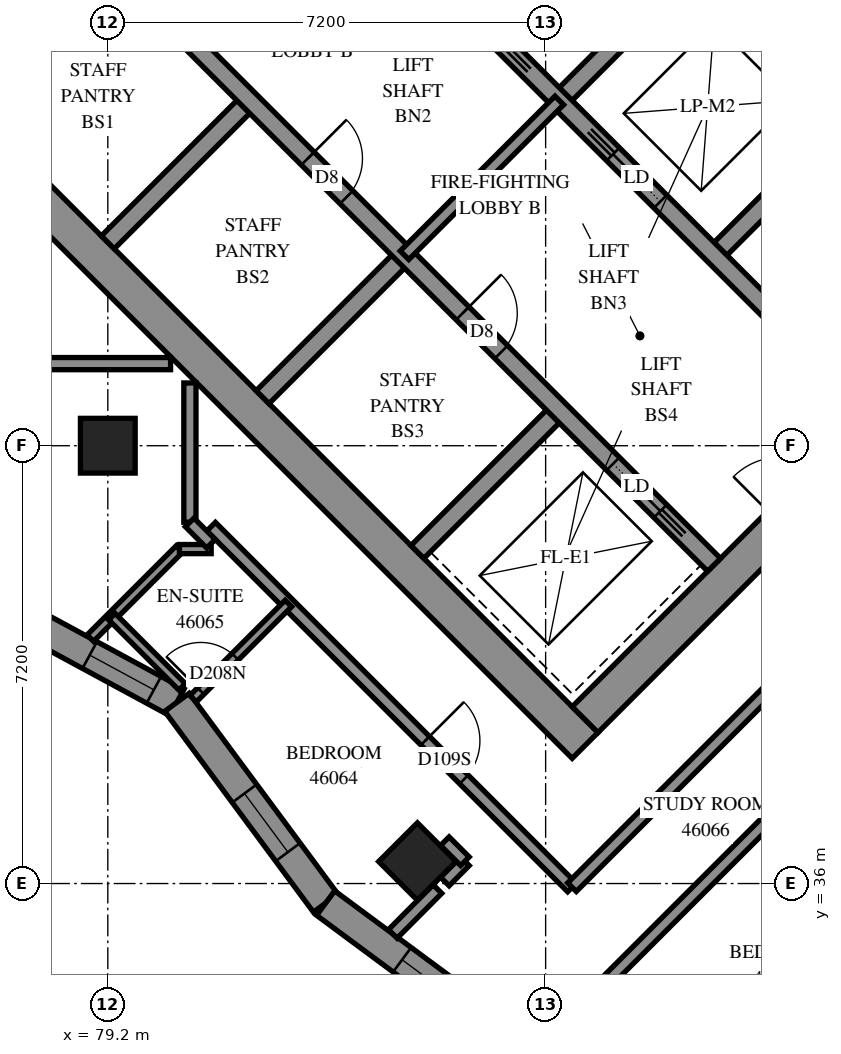
"""IFC4 building model, lengths in metres.
Left out: names, types, materials, properties, quantities, classifications, styles, units other than length and angle.
Written with IfcOpenShell. Run it as: python <this file> out.ifc"""

import sys

from ifc_helpers import new_model, si_unit, direction, frame, frame_2d, origin, origin_2d, place, context, subcontext, project, spatial, polyline, rectangle, outline, extrude, element, fill, save


model = new_model("IFC4")
c1 = context("Model", 3, precision=1e-05, world=origin(), true_north=direction((0.0, 1.0)))
c2 = subcontext(c1, "Body", "Model", "MODEL_VIEW")
j1 = project(units=[si_unit("LENGTHUNIT", "METRE"), si_unit("PLANEANGLEUNIT", "RADIAN")], contexts=[c1])
p1 = place(None, origin())
s1 = spatial("IfcSite", under=j1, at=p1, CompositionType="ELEMENT")
p2 = place(p1, origin())
s2 = spatial("IfcBuilding", under=s1, at=p2, CompositionType="ELEMENT")
p3 = place(p2, frame((0.0, 0.0, 169.4)))
s3 = spatial("IfcBuildingStorey", under=s2, at=p3, CompositionType="ELEMENT", Elevation=169.4)
for number, where, z_axis, x_axis in (
    (1, (79.2, 43.2, 0.0), (0.0, 0.0, 1.0), (1.0, 0.0, 0.0)),
    (2, (84.291, 36.362, 0.0), (0.0, 0.0, 1.0), (0.707, -0.707, 0.0)),
):
    element("IfcColumn", number, at=place(p3, frame(where, z_axis=z_axis, x_axis=x_axis)), inside=s3, PredefinedType="COLUMN", context=c2, shape_type="SweptSolid", body=[
        extrude(rectangle(XDim=0.9, YDim=0.9, at=origin_2d()), origin(), (0.0, 0.0, 1.0), 3.1),
    ])
p4 = place(p3, frame((76.018, 49.302, -0.3), z_axis=(0.0, 0.0, 1.0), x_axis=(0.7071067812, -0.7071067812, 0.0)))
e3 = element("IfcWall", 3, at=p4, inside=s3, PredefinedType="SHEAR", context=c2, shape_type="SweptSolid", body=[
    extrude(rectangle(XDim=15.6, YDim=0.6, at=frame_2d((7.8, 0.0))), origin(), (0.0, 0.0, 1.0), 2.7),
])
p5 = place(p3, frame((86.625, 59.908, -0.3), z_axis=(0.0, 0.0, 1.0), x_axis=(0.7071067812, -0.7071067812, 0.0)))
e4 = element("IfcWall", 4, at=p5, inside=s3, PredefinedType="SHEAR", context=c2, shape_type="SweptSolid", body=[
    extrude(rectangle(XDim=15.6, YDim=0.6, at=frame_2d((7.8, 0.0))), origin(), (0.0, 0.0, 1.0), 2.7),
])
p6 = place(p5, frame((10.6, 0.0, 0.3)))
e5 = element("IfcOpeningElement", 5, at=p6, cuts=e4, PredefinedType="OPENING", context=c2, shape_type="SweptSolid", body=[
    extrude(rectangle(XDim=0.8, YDim=2.1, at=frame_2d((0.4, 1.05))), frame((0.0, 0.31, 0.0), z_axis=(0.0, -1.0, 0.0), x_axis=(1.0, 0.0, 0.0)), (0.0, 0.0, 1.0), 0.62),
])
p7 = place(p3, frame((76.442, 49.302, -0.3), z_axis=(0.0, 0.0, 1.0), x_axis=(0.7071067812, 0.7071067812, 0.0)))
e6 = element("IfcWall", 6, at=p7, inside=s3, PredefinedType="SHEAR", context=c2, shape_type="SweptSolid", body=[
    extrude(rectangle(XDim=14.4, YDim=0.6, at=frame_2d((7.2, 0.0))), origin(), (0.0, 0.0, 1.0), 2.7),
])
p8 = place(p7, frame((4.55, 0.0, 0.3)))
e7 = element("IfcOpeningElement", 7, at=p8, cuts=e6, PredefinedType="OPENING", context=c2, shape_type="SweptSolid", body=[
    extrude(rectangle(XDim=1.1, YDim=2.1, at=frame_2d((0.55, 1.05))), frame((0.0, 0.31, 0.0), z_axis=(0.0, -1.0, 0.0), x_axis=(1.0, 0.0, 0.0)), (0.0, 0.0, 1.0), 0.62),
])
p9 = place(p7, frame((11.35, 0.0, 0.3)))
e8 = element("IfcOpeningElement", 8, at=p9, cuts=e6, PredefinedType="OPENING", context=c2, shape_type="SweptSolid", body=[
    extrude(rectangle(XDim=1.1, YDim=2.1, at=frame_2d((0.55, 1.05))), frame((0.0, 0.31, 0.0), z_axis=(0.0, -1.0, 0.0), x_axis=(1.0, 0.0, 0.0)), (0.0, 0.0, 1.0), 0.62),
])
p10 = place(p3, frame((87.049, 38.695, -0.3), z_axis=(0.0, 0.0, 1.0), x_axis=(0.7071067812, 0.7071067812, 0.0)))
e9 = element("IfcWall", 9, at=p10, inside=s3, PredefinedType="SHEAR", context=c2, shape_type="SweptSolid", body=[
    extrude(rectangle(XDim=14.4, YDim=0.6, at=frame_2d((7.2, 0.0))), origin(), (0.0, 0.0, 1.0), 2.7),
])
p11 = place(p10, frame((4.55, 0.0, 0.3)))
e10 = element("IfcOpeningElement", 10, at=p11, cuts=e9, PredefinedType="OPENING", context=c2, shape_type="SweptSolid", body=[
    extrude(rectangle(XDim=1.1, YDim=2.1, at=frame_2d((0.55, 1.05))), frame((0.0, 0.31, 0.0), z_axis=(0.0, -1.0, 0.0), x_axis=(1.0, 0.0, 0.0)), (0.0, 0.0, 1.0), 0.62),
])
p12 = place(p10, frame((11.35, 0.0, 0.3)))
e11 = element("IfcOpeningElement", 11, at=p12, cuts=e9, PredefinedType="OPENING", context=c2, shape_type="SweptSolid", body=[
    extrude(rectangle(XDim=1.1, YDim=2.1, at=frame_2d((0.55, 1.05))), frame((0.0, 0.31, 0.0), z_axis=(0.0, -1.0, 0.0), x_axis=(1.0, 0.0, 0.0)), (0.0, 0.0, 1.0), 0.62),
])
p13 = place(p3, frame((79.2, 46.544, 0.0), z_axis=(0.0, 0.0, 1.0), x_axis=(0.7071219326, 0.7070916295, 0.0)))
e12 = element("IfcWall", 12, at=p13, inside=s3, PredefinedType="SOLIDWALL", context=c2, shape_type="SweptSolid", body=[
    extrude(rectangle(XDim=3.3, YDim=0.3, at=frame_2d((1.65, 0.0))), origin(), (0.0, 0.0, 1.0), 3.1),
])
p14 = place(p3, frame((81.746, 43.999, 0.0), z_axis=(0.0, 0.0, 1.0), x_axis=(0.7071067812, 0.7071067812, 0.0)))
e13 = element("IfcWall", 13, at=p14, inside=s3, PredefinedType="SOLIDWALL", context=c2, shape_type="SweptSolid", body=[
    extrude(rectangle(XDim=3.3, YDim=0.3, at=frame_2d((1.65, 0.0))), origin(), (0.0, 0.0, 1.0), 3.1),
])
p15 = place(p3, frame((86.625, 48.878, 0.0), z_axis=(0.0, 0.0, 1.0), x_axis=(0.7071067812, 0.7071067812, 0.0)))
e14 = element("IfcWall", 14, at=p15, inside=s3, PredefinedType="SOLIDWALL", context=c2, shape_type="SweptSolid", body=[
    extrude(rectangle(XDim=3.3, YDim=0.3, at=frame_2d((1.65, 0.0))), origin(), (0.0, 0.0, 1.0), 3.1),
])
p16 = place(p3, frame((84.291, 41.453, 0.0), z_axis=(0.0, 0.0, 1.0), x_axis=(0.7071067812, 0.7071067812, 0.0)))
e15 = element("IfcWall", 15, at=p16, inside=s3, PredefinedType="SOLIDWALL", context=c2, shape_type="SweptSolid", body=[
    extrude(rectangle(XDim=3.3, YDim=0.3, at=frame_2d((1.65, 0.0))), origin(), (0.0, 0.0, 1.0), 3.1),
])
p17 = place(p3, frame((89.17, 46.332, 0.0), z_axis=(0.0, 0.0, 1.0), x_axis=(0.7071067812, 0.7071067812, 0.0)))
e16 = element("IfcWall", 16, at=p17, inside=s3, PredefinedType="SOLIDWALL", context=c2, shape_type="SweptSolid", body=[
    extrude(rectangle(XDim=3.3, YDim=0.3, at=frame_2d((1.65, 0.0))), origin(), (0.0, 0.0, 1.0), 3.1),
])
p18 = place(p3, frame((78.988, 51.423, 0.0), z_axis=(0.0, 0.0, 1.0), x_axis=(0.7071067812, -0.7071067812, 0.0)))
e17 = element("IfcWall", 17, at=p18, inside=s3, PredefinedType="SOLIDWALL", context=c2, shape_type="SweptSolid", body=[
    extrude(rectangle(XDim=14.4, YDim=0.3, at=frame_2d((7.2, 0.0))), origin(), (0.0, 0.0, 1.0), 3.1),
])
p19 = place(p18, frame((1.35, 0.0, 0.0)))
e18 = element("IfcOpeningElement", 18, at=p19, cuts=e17, PredefinedType="OPENING", context=c2, shape_type="SweptSolid", body=[
    extrude(rectangle(XDim=0.9, YDim=2.1, at=frame_2d((0.45, 1.05))), frame((0.0, 0.16, 0.0), z_axis=(0.0, -1.0, 0.0), x_axis=(1.0, 0.0, 0.0)), (0.0, 0.0, 1.0), 0.32),
])
p20 = place(p18, frame((4.95, 0.0, 0.0)))
e19 = element("IfcOpeningElement", 19, at=p20, cuts=e17, PredefinedType="OPENING", context=c2, shape_type="SweptSolid", body=[
    extrude(rectangle(XDim=0.9, YDim=2.1, at=frame_2d((0.45, 1.05))), frame((0.0, 0.16, 0.0), z_axis=(0.0, -1.0, 0.0), x_axis=(1.0, 0.0, 0.0)), (0.0, 0.0, 1.0), 0.32),
])
p21 = place(p18, frame((8.55, 0.0, 0.0)))
e20 = element("IfcOpeningElement", 20, at=p21, cuts=e17, PredefinedType="OPENING", context=c2, shape_type="SweptSolid", body=[
    extrude(rectangle(XDim=0.9, YDim=2.1, at=frame_2d((0.45, 1.05))), frame((0.0, 0.16, 0.0), z_axis=(0.0, -1.0, 0.0), x_axis=(1.0, 0.0, 0.0)), (0.0, 0.0, 1.0), 0.32),
])
p22 = place(p18, frame((12.05, 0.0, 0.0)))
e21 = element("IfcOpeningElement", 21, at=p22, cuts=e17, PredefinedType="OPENING", context=c2, shape_type="SweptSolid", body=[
    extrude(rectangle(XDim=1.1, YDim=2.1, at=frame_2d((0.55, 1.05))), frame((0.0, 0.16, 0.0), z_axis=(0.0, -1.0, 0.0), x_axis=(1.0, 0.0, 0.0)), (0.0, 0.0, 1.0), 0.32),
])
p23 = place(p3, frame((81.534, 53.969, 0.0), z_axis=(0.0, 0.0, 1.0), x_axis=(0.707103309, -0.7071102534, 0.0)))
e22 = element("IfcWall", 22, at=p23, inside=s3, PredefinedType="SOLIDWALL", context=c2, shape_type="SweptSolid", body=[
    extrude(rectangle(XDim=14.4, YDim=0.3, at=frame_2d((7.2, 0.0))), origin(), (0.0, 0.0, 1.0), 3.1),
])
p24 = place(p23, frame((1.25, 0.0, 0.0)))
e23 = element("IfcOpeningElement", 23, at=p24, cuts=e22, PredefinedType="OPENING", context=c2, shape_type="SweptSolid", body=[
    extrude(rectangle(XDim=1.1, YDim=2.1, at=frame_2d((0.55, 1.05))), frame((0.0, 0.16, 0.0), z_axis=(0.0, -1.0, 0.0), x_axis=(1.0, 0.0, 0.0)), (0.0, 0.0, 1.0), 0.32),
])
p25 = place(p23, frame((4.85, 0.0, 0.0)))
e24 = element("IfcOpeningElement", 24, at=p25, cuts=e22, PredefinedType="OPENING", context=c2, shape_type="SweptSolid", body=[
    extrude(rectangle(XDim=1.1, YDim=2.1, at=frame_2d((0.55, 1.05))), frame((0.0, 0.16, 0.0), z_axis=(0.0, -1.0, 0.0), x_axis=(1.0, 0.0, 0.0)), (0.0, 0.0, 1.0), 0.32),
])
p26 = place(p23, frame((8.45, 0.0, 0.0)))
e25 = element("IfcOpeningElement", 25, at=p26, cuts=e22, PredefinedType="OPENING", context=c2, shape_type="SweptSolid", body=[
    extrude(rectangle(XDim=1.1, YDim=2.1, at=frame_2d((0.55, 1.05))), frame((0.0, 0.16, 0.0), z_axis=(0.0, -1.0, 0.0), x_axis=(1.0, 0.0, 0.0)), (0.0, 0.0, 1.0), 0.32),
])
p27 = place(p23, frame((12.05, 0.0, 0.0)))
e26 = element("IfcOpeningElement", 26, at=p27, cuts=e22, PredefinedType="OPENING", context=c2, shape_type="SweptSolid", body=[
    extrude(rectangle(XDim=1.1, YDim=2.1, at=frame_2d((0.55, 1.05))), frame((0.0, 0.16, 0.0), z_axis=(0.0, -1.0, 0.0), x_axis=(1.0, 0.0, 0.0)), (0.0, 0.0, 1.0), 0.32),
])
p28 = place(p3, frame((88.958, 51.211, 0.0), z_axis=(0.0, 0.0, 1.0), x_axis=(0.7070998367, -0.7071137256, 0.0)))
e27 = element("IfcWall", 27, at=p28, inside=s3, PredefinedType="SOLIDWALL", context=c2, shape_type="SweptSolid", body=[
    extrude(rectangle(XDim=7.2, YDim=0.3, at=frame_2d((3.6, 0.0))), origin(), (0.0, 0.0, 1.0), 3.1),
])
p29 = place(p3, frame((76.559, 41.026, 0.0), z_axis=(0.0, 0.0, 1.0), x_axis=(0.8793114622, -0.4762471547, 0.0)))
e28 = element("IfcWall", 28, at=p29, inside=s3, PredefinedType="SOLIDWALL", context=c2, shape_type="SweptSolid", body=[
    extrude(outline(polyline([(0.02, -0.25), (4.241, -0.25), (4.352, 0.25), (-0.02, 0.25), (0.02, -0.25)])), origin(), (0.0, 0.0, 1.0), 3.1),
])
p30 = place(p29, frame((0.317, 0.0, 0.45)))
e29 = element("IfcOpeningElement", 29, at=p30, cuts=e28, PredefinedType="OPENING", context=c2, shape_type="SweptSolid", body=[
    extrude(rectangle(XDim=1.2, YDim=2.5, at=frame_2d((0.6, 1.25))), frame((0.0, 0.26, 0.0), z_axis=(0.0, -1.0, 0.0), x_axis=(1.0, 0.0, 0.0)), (0.0, 0.0, 1.0), 0.52),
])
p31 = place(p29, frame((2.665, 0.0, 0.45)))
e30 = element("IfcOpeningElement", 30, at=p31, cuts=e28, PredefinedType="OPENING", context=c2, shape_type="SweptSolid", body=[
    extrude(rectangle(XDim=1.2, YDim=2.5, at=frame_2d((0.6, 1.25))), frame((0.0, 0.26, 0.0), z_axis=(0.0, -1.0, 0.0), x_axis=(1.0, 0.0, 0.0)), (0.0, 0.0, 1.0), 0.52),
])
p32 = place(p3, frame((80.337, 38.98, 0.0), z_axis=(0.0, 0.0, 1.0), x_axis=(0.5951291823, -0.8036300495, 0.0)))
e31 = element("IfcWall", 31, at=p32, inside=s3, PredefinedType="SOLIDWALL", context=c2, shape_type="SweptSolid", body=[
    extrude(outline(polyline([(0.056, -0.25), (4.146, -0.25), (4.072, 0.25), (-0.056, 0.25), (0.056, -0.25)])), origin(), (0.0, 0.0, 1.0), 3.1),
])
p33 = place(p32, frame((1.865, 0.0, 0.45)))
e32 = element("IfcOpeningElement", 32, at=p33, cuts=e31, PredefinedType="OPENING", context=c2, shape_type="SweptSolid", body=[
    extrude(rectangle(XDim=1.2, YDim=2.5, at=frame_2d((0.6, 1.25))), frame((0.0, 0.26, 0.0), z_axis=(0.0, -1.0, 0.0), x_axis=(1.0, 0.0, 0.0)), (0.0, 0.0, 1.0), 0.52),
])
p34 = place(p3, frame((82.782, 35.678, 0.0), z_axis=(0.0, 0.0, 1.0), x_axis=(0.8036316743, -0.5951269881, 0.0)))
e33 = element("IfcWall", 33, at=p34, inside=s3, PredefinedType="SOLIDWALL", context=c2, shape_type="SweptSolid", body=[
    extrude(outline(polyline([(-0.037, -0.25), (4.053, -0.25), (4.128, 0.25), (0.037, 0.25), (-0.037, -0.25)])), origin(), (0.0, 0.0, 1.0), 3.1),
])
p35 = place(p34, frame((1.565, 0.0, 0.7)))
e34 = element("IfcOpeningElement", 34, at=p35, cuts=e33, PredefinedType="OPENING", context=c2, shape_type="SweptSolid", body=[
    extrude(rectangle(XDim=1.8, YDim=2.2, at=frame_2d((0.9, 1.1))), frame((0.0, 0.26, 0.0), z_axis=(0.0, -1.0, 0.0), x_axis=(1.0, 0.0, 0.0)), (0.0, 0.0, 1.0), 0.52),
])
p36 = place(p3, frame((84.079, 46.332, 0.0), z_axis=(0.0, 0.0, 1.0), x_axis=(0.7071067812, 0.7071067812, 0.0)))
e35 = element("IfcWall", 35, at=p36, inside=s3, PredefinedType="PARTITIONING", context=c2, shape_type="SweptSolid", body=[
    extrude(rectangle(XDim=3.6, YDim=0.2, at=frame_2d((1.8, 0.0))), origin(), (0.0, 0.0, 1.0), 3.1),
])
p37 = place(p3, frame((80.899, 41.869, 0.0), z_axis=(0.0, 0.0, 1.0), x_axis=(0.7071067812, -0.7071067812, 0.0)))
e36 = element("IfcWall", 36, at=p37, inside=s3, PredefinedType="PARTITIONING", context=c2, shape_type="SweptSolid", body=[
    extrude(rectangle(XDim=8.392, YDim=0.2, at=frame_2d((4.196, 0.0))), origin(), (0.0, 0.0, 1.0), 3.1),
])
p38 = place(p37, frame((4.979, 0.0, 0.0)))
e37 = element("IfcOpeningElement", 37, at=p38, cuts=e36, PredefinedType="OPENING", context=c2, shape_type="SweptSolid", body=[
    extrude(rectangle(XDim=0.9, YDim=2.1, at=frame_2d((0.45, 1.05))), frame((0.0, 0.11, 0.0), z_axis=(0.0, -1.0, 0.0), x_axis=(1.0, 0.0, 0.0)), (0.0, 0.0, 1.0), 0.22),
])
p39 = place(p3, frame((86.834, 35.94, 0.0), z_axis=(0.0, 0.0, 1.0), x_axis=(0.7072486139, 0.7069649201, 0.0)))
e38 = element("IfcWall", 38, at=p39, inside=s3, PredefinedType="PARTITIONING", context=c2, shape_type="SweptSolid", body=[
    extrude(rectangle(XDim=7.05, YDim=0.2, at=frame_2d((3.525, 0.0))), origin(), (0.0, 0.0, 1.0), 3.1),
])
p40 = place(p39, frame((5.848, 0.0, 0.0)))
e39 = element("IfcOpeningElement", 39, at=p40, cuts=e38, PredefinedType="OPENING", context=c2, shape_type="SweptSolid", body=[
    extrude(rectangle(XDim=1.0, YDim=2.1, at=frame_2d((0.5, 1.05))), frame((0.0, 0.11, 0.0), z_axis=(0.0, -1.0, 0.0), x_axis=(1.0, 0.0, 0.0)), (0.0, 0.0, 1.0), 0.22),
])
p41 = place(p3, frame((86.329, 33.313, 0.0), z_axis=(0.0, 0.0, 1.0), x_axis=(0.7072524502, 0.7069610821, 0.0)))
e40 = element("IfcWall", 40, at=p41, inside=s3, PredefinedType="PARTITIONING", context=c2, shape_type="SweptSolid", body=[
    extrude(rectangle(XDim=6.864, YDim=0.2, at=frame_2d((3.432, 0.0))), origin(), (0.0, 0.0, 1.0), 3.1),
])
p42 = place(p3, frame((89.831, 31.721, 0.0), z_axis=(0.0, 0.0, 1.0), x_axis=(0.7071067812, 0.7071067812, 0.0)))
e41 = element("IfcWall", 41, at=p42, inside=s3, PredefinedType="PARTITIONING", context=c2, shape_type="SweptSolid", body=[
    extrude(rectangle(XDim=5.928, YDim=0.2, at=frame_2d((2.964, 0.0))), origin(), (0.0, 0.0, 1.0), 3.1),
])
for number, where, z_axis, x_axis in (
    (42, (77.942, 44.55, 0.0), (0.0, 0.0, 1.0), (1.0, 0.0, 0.0)),
    (43, (80.55, 41.942, 0.0), (0.0, 0.0, 1.0), (0.0, 1.0, 0.0)),
):
    element("IfcWall", number, at=place(p3, frame(where, z_axis=z_axis, x_axis=x_axis)), inside=s3, PredefinedType="PARTITIONING", context=c2, shape_type="SweptSolid", body=[
        extrude(rectangle(XDim=2.29, YDim=0.2, at=frame_2d((1.145, 0.0))), origin(), (0.0, 0.0, 1.0), 3.1),
    ])
p43 = place(p3, frame((80.604, 39.04, 0.0), z_axis=(0.0, 0.0, 1.0), x_axis=(0.7071067812, 0.7071067812, 0.0)))
e44 = element("IfcWall", 44, at=p43, inside=s3, PredefinedType="PARTITIONING", context=c2, shape_type="SweptSolid", body=[
    extrude(rectangle(XDim=2.213, YDim=0.15, at=frame_2d((1.107, 0.0))), origin(), (0.0, 0.0, 1.0), 3.1),
])
p44 = place(p43, frame((0.176, 0.0, 0.0)))
e45 = element("IfcOpeningElement", 45, at=p44, cuts=e44, PredefinedType="OPENING", context=c2, shape_type="SweptSolid", body=[
    extrude(rectangle(XDim=0.8, YDim=2.1, at=frame_2d((0.4, 1.05))), frame((0.0, 0.085, 0.0), z_axis=(0.0, -1.0, 0.0), x_axis=(1.0, 0.0, 0.0)), (0.0, 0.0, 1.0), 0.17),
])
p45 = place(p3, frame((78.913, 40.036, 0.0), z_axis=(0.0, 0.0, 1.0), x_axis=(0.7071067812, 0.7071067812, 0.0)))
e46 = element("IfcWall", 46, at=p45, inside=s3, PredefinedType="PARTITIONING", context=c2, shape_type="SweptSolid", body=[
    extrude(rectangle(XDim=2.071, YDim=0.15, at=frame_2d((1.036, 0.0))), origin(), (0.0, 0.0, 1.0), 3.1),
])
p46 = place(p3, frame((79.267, 40.389, 0.0), z_axis=(0.0, 0.0, 1.0), x_axis=(0.7071067812, -0.7071067812, 0.0)))
e47 = element("IfcWall", 47, at=p46, inside=s3, PredefinedType="PARTITIONING", context=c2, shape_type="SweptSolid", body=[
    extrude(rectangle(XDim=1.633, YDim=0.15, at=frame_2d((0.817, 0.0))), origin(), (0.0, 0.0, 1.0), 3.1),
])
p47 = place(p3, frame((83.887, 35.172, 0.0), z_axis=(0.0, 0.0, 1.0), x_axis=(0.7051824299, 0.7090259096, 0.0)))
e48 = element("IfcWall", 48, at=p47, inside=s3, PredefinedType="PARTITIONING", context=c2, shape_type="SweptSolid", body=[
    extrude(rectangle(XDim=1.041, YDim=0.2, at=frame_2d((0.52, 0.0))), origin(), (0.0, 0.0, 1.0), 3.1),
])
p48 = place(p3, frame((80.378, 41.5, 0.0), z_axis=(0.0, 0.0, 1.0), x_axis=(1.0, 0.0, 0.0)))
e49 = element("IfcWall", 49, at=p48, inside=s3, PredefinedType="PARTITIONING", context=c2, shape_type="SweptSolid", body=[
    extrude(rectangle(XDim=0.522, YDim=0.15, at=frame_2d((0.261, 0.0))), origin(), (0.0, 0.0, 1.0), 3.1),
])
p49 = place(p3, frame((80.546, 41.938, 0.0), z_axis=(0.0, 0.0, 1.0), x_axis=(0.7071067812, -0.7071067812, 0.0)))
e50 = element("IfcWall", 50, at=p49, inside=s3, PredefinedType="PARTITIONING", context=c2, shape_type="SweptSolid", body=[
    extrude(rectangle(XDim=0.495, YDim=0.2, at=frame_2d((0.247, 0.0))), origin(), (0.0, 0.0, 1.0), 3.1),
])
p50 = place(p3, frame((84.742, 36.034, 0.0), z_axis=(0.0, 0.0, 1.0), x_axis=(0.7049672897, 0.7092398187, 0.0)))
e51 = element("IfcWall", 51, at=p50, inside=s3, PredefinedType="PARTITIONING", context=c2, shape_type="SweptSolid", body=[
    extrude(rectangle(XDim=0.468, YDim=0.2, at=frame_2d((0.234, 0.0))), origin(), (0.0, 0.0, 1.0), 3.1),
])
p51 = place(p3, frame((84.742, 36.696, 0.0), z_axis=(0.0, 0.0, 1.0), x_axis=(0.7071067812, -0.7071067812, 0.0)))
e52 = element("IfcWall", 52, at=p51, inside=s3, PredefinedType="PARTITIONING", context=c2, shape_type="SweptSolid", body=[
    extrude(rectangle(XDim=0.467, YDim=0.2, at=frame_2d((0.233, 0.0))), origin(), (0.0, 0.0, 1.0), 3.1),
])
p52 = place(p31, origin())
e53 = element("IfcWindow", 53, at=p52, inside=s3, PartitioningType="SINGLE_PANEL", PredefinedType="WINDOW", context=c2, shape_type="SweptSolid", body=[
    extrude(rectangle(XDim=1.2, YDim=2.5, at=frame_2d((0.6, 1.25))), frame((0.0, 0.18, 0.0), z_axis=(0.0, -1.0, 0.0), x_axis=(1.0, 0.0, 0.0)), (0.0, 0.0, 1.0), 0.06),
])
fill(e30, e53)
p53 = place(p33, origin())
e54 = element("IfcWindow", 54, at=p53, inside=s3, PartitioningType="SINGLE_PANEL", PredefinedType="WINDOW", context=c2, shape_type="SweptSolid", body=[
    extrude(rectangle(XDim=1.2, YDim=2.5, at=frame_2d((0.6, 1.25))), frame((0.0, 0.18, 0.0), z_axis=(0.0, -1.0, 0.0), x_axis=(1.0, 0.0, 0.0)), (0.0, 0.0, 1.0), 0.06),
])
fill(e32, e54)
p54 = place(p20, origin())
e55 = element("IfcDoor", 55, at=p54, inside=s3, OperationType="SINGLE_SWING_LEFT", PredefinedType="DOOR", context=c2, shape_type="SweptSolid", body=[
    extrude(rectangle(XDim=0.9, YDim=2.1, at=frame_2d((0.45, 1.05))), frame((0.0, 0.025, 0.0), z_axis=(0.0, -1.0, 0.0), x_axis=(1.0, 0.0, 0.0)), (0.0, 0.0, 1.0), 0.05),
])
fill(e19, e55)
p55 = place(p21, origin())
e56 = element("IfcDoor", 56, at=p55, inside=s3, OperationType="SINGLE_SWING_LEFT", PredefinedType="DOOR", context=c2, shape_type="SweptSolid", body=[
    extrude(rectangle(XDim=0.9, YDim=2.1, at=frame_2d((0.45, 1.05))), frame((0.0, 0.025, 0.0), z_axis=(0.0, -1.0, 0.0), x_axis=(1.0, 0.0, 0.0)), (0.0, 0.0, 1.0), 0.05),
])
fill(e20, e56)
p56 = place(p22, origin())
e57 = element("IfcDoor", 57, at=p56, inside=s3, OperationType="SLIDING_TO_RIGHT", PredefinedType="DOOR", context=c2, shape_type="SweptSolid", body=[
    extrude(rectangle(XDim=1.1, YDim=2.1, at=frame_2d((0.55, 1.05))), frame((0.0, 0.025, 0.0), z_axis=(0.0, -1.0, 0.0), x_axis=(1.0, 0.0, 0.0)), (0.0, 0.0, 1.0), 0.05),
])
fill(e21, e57)
p57 = place(p26, origin())
e58 = element("IfcDoor", 58, at=p57, inside=s3, OperationType="SLIDING_TO_LEFT", PredefinedType="DOOR", context=c2, shape_type="SweptSolid", body=[
    extrude(rectangle(XDim=1.1, YDim=2.1, at=frame_2d((0.55, 1.05))), frame((0.0, 0.025, 0.0), z_axis=(0.0, -1.0, 0.0), x_axis=(1.0, 0.0, 0.0)), (0.0, 0.0, 1.0), 0.05),
])
fill(e25, e58)
p58 = place(p38, origin())
e59 = element("IfcDoor", 59, at=p58, inside=s3, OperationType="SINGLE_SWING_RIGHT", PredefinedType="DOOR", context=c2, shape_type="SweptSolid", body=[
    extrude(rectangle(XDim=0.9, YDim=2.1, at=frame_2d((0.45, 1.05))), frame((0.0, 0.025, 0.0), z_axis=(0.0, -1.0, 0.0), x_axis=(1.0, 0.0, 0.0)), (0.0, 0.0, 1.0), 0.05),
])
fill(e37, e59)
p59 = place(p44, origin())
e60 = element("IfcDoor", 60, at=p59, inside=s3, OperationType="SINGLE_SWING_RIGHT", PredefinedType="DOOR", context=c2, shape_type="SweptSolid", body=[
    extrude(rectangle(XDim=0.8, YDim=2.1, at=frame_2d((0.4, 1.05))), frame((0.0, 0.025, 0.0), z_axis=(0.0, -1.0, 0.0), x_axis=(1.0, 0.0, 0.0)), (0.0, 0.0, 1.0), 0.05),
])
fill(e45, e60)
p60 = place(p35, origin())
e61 = element("IfcWindow", 61, at=p60, inside=s3, PartitioningType="SINGLE_PANEL", PredefinedType="WINDOW", context=c2, shape_type="SweptSolid", body=[
    extrude(rectangle(XDim=1.8, YDim=2.2, at=frame_2d((0.9, 1.1))), frame((0.0, 0.18, 0.0), z_axis=(0.0, -1.0, 0.0), x_axis=(1.0, 0.0, 0.0)), (0.0, 0.0, 1.0), 0.06),
])
fill(e34, e61)
save(model, sys.argv[1])
